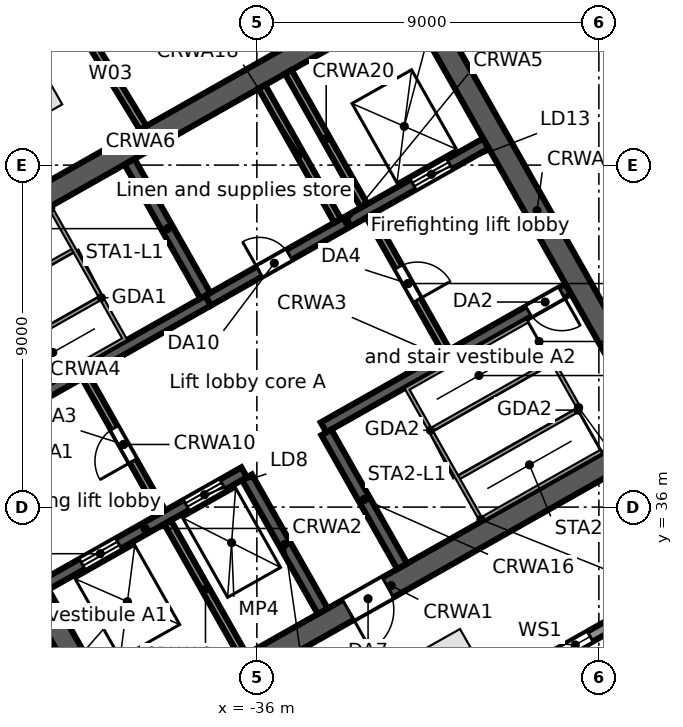
"""IFC4 building model, lengths in metres.
Left out: names, types, materials, properties, quantities, classifications, styles, units other than length and angle.
Written with IfcOpenShell. Run it as: python <this file> out.ifc"""

import sys

from ifc_helpers import new_model, si_unit, direction, frame, frame_2d, origin, origin_2d, place, context, subcontext, project, spatial, rectangle, extrude, element, fill, save


model = new_model("IFC4")
c1 = context("Model", 3, precision=1e-05, world=origin(), true_north=direction((0.0, 1.0)))
c2 = subcontext(c1, "Body", "Model", "MODEL_VIEW")
j1 = project(units=[si_unit("LENGTHUNIT", "METRE"), si_unit("PLANEANGLEUNIT", "RADIAN")], contexts=[c1])
p1 = place(None, origin())
s1 = spatial("IfcSite", under=j1, at=p1, CompositionType="ELEMENT")
p2 = place(p1, origin())
s2 = spatial("IfcBuilding", under=s1, at=p2, CompositionType="ELEMENT")
p3 = place(p2, frame((0.0, 0.0, 86.5)))
s3 = spatial("IfcBuildingStorey", under=s2, at=p3, CompositionType="ELEMENT", Elevation=86.5)
for number, where, z_axis, x_axis in (
    (1, (-42.28, 46.919, 0.0), (0.0, 0.0, 1.0), (-0.87, -0.492, 0.0)),
    (2, (-30.976, 31.635, 0.0), (0.0, 0.0, 1.0), (0.87, 0.492, 0.0)),
):
    element("IfcColumn", number, at=place(p3, frame(where, z_axis=z_axis, x_axis=x_axis)), inside=s3, PredefinedType="COLUMN", context=c2, shape_type="SweptSolid", body=[
        extrude(rectangle(XDim=1.7, YDim=1.7, at=origin_2d()), origin(), (0.0, 0.0, 1.0), 5.0),
    ])
p4 = place(p3, frame((-58.745, 38.764, 0.0), z_axis=(0.0, 0.0, 1.0), x_axis=(0.870355811726, 0.492423355453, 0.0)))
e3 = element("IfcWall", 3, at=p4, inside=s3, PredefinedType="STANDARD", context=c2, shape_type="SweptSolid", body=[
    extrude(rectangle(XDim=64.025, YDim=0.3, at=frame_2d((32.013, 0.0))), origin(), (0.0, 0.0, 1.0), 4.65),
])
p5 = place(p4, frame((60.122, 0.0, 0.6)))
e4 = element("IfcOpeningElement", 4, at=p5, cuts=e3, PredefinedType="OPENING", context=c2, shape_type="SweptSolid", body=[
    extrude(rectangle(XDim=0.9, YDim=3.2, at=frame_2d((0.45, 1.6))), frame((0.0, 0.16, 0.0), z_axis=(0.0, -1.0, 0.0), x_axis=(1.0, 0.0, 0.0)), (0.0, 0.0, 1.0), 0.32),
])
p6 = place(p4, frame((50.992, 0.0, 0.6)))
e5 = element("IfcOpeningElement", 5, at=p6, cuts=e3, PredefinedType="OPENING", context=c2, shape_type="SweptSolid", body=[
    extrude(rectangle(XDim=0.9, YDim=3.2, at=frame_2d((0.45, 1.6))), frame((0.0, 0.16, 0.0), z_axis=(0.0, -1.0, 0.0), x_axis=(1.0, 0.0, 0.0)), (0.0, 0.0, 1.0), 0.32),
])
p7 = place(p4, frame((41.862, 0.0, 0.6)))
e6 = element("IfcOpeningElement", 6, at=p7, cuts=e3, PredefinedType="OPENING", context=c2, shape_type="SweptSolid", body=[
    extrude(rectangle(XDim=0.9, YDim=3.2, at=frame_2d((0.45, 1.6))), frame((0.0, 0.16, 0.0), z_axis=(0.0, -1.0, 0.0), x_axis=(1.0, 0.0, 0.0)), (0.0, 0.0, 1.0), 0.32),
])
p8 = place(p4, frame((32.732, 0.0, 0.6)))
e7 = element("IfcOpeningElement", 7, at=p8, cuts=e3, PredefinedType="OPENING", context=c2, shape_type="SweptSolid", body=[
    extrude(rectangle(XDim=0.9, YDim=3.2, at=frame_2d((0.45, 1.6))), frame((0.0, 0.16, 0.0), z_axis=(0.0, -1.0, 0.0), x_axis=(1.0, 0.0, 0.0)), (0.0, 0.0, 1.0), 0.32),
])
p9 = place(p4, frame((23.602, 0.0, 0.6)))
e8 = element("IfcOpeningElement", 8, at=p9, cuts=e3, PredefinedType="OPENING", context=c2, shape_type="SweptSolid", body=[
    extrude(rectangle(XDim=0.9, YDim=3.2, at=frame_2d((0.45, 1.6))), frame((0.0, 0.16, 0.0), z_axis=(0.0, -1.0, 0.0), x_axis=(1.0, 0.0, 0.0)), (0.0, 0.0, 1.0), 0.32),
])
p10 = place(p4, frame((14.472, 0.0, 0.6)))
e9 = element("IfcOpeningElement", 9, at=p10, cuts=e3, PredefinedType="OPENING", context=c2, shape_type="SweptSolid", body=[
    extrude(rectangle(XDim=0.9, YDim=3.2, at=frame_2d((0.45, 1.6))), frame((0.0, 0.16, 0.0), z_axis=(0.0, -1.0, 0.0), x_axis=(1.0, 0.0, 0.0)), (0.0, 0.0, 1.0), 0.32),
])
p11 = place(p4, frame((5.342, 0.0, 0.6)))
e10 = element("IfcOpeningElement", 10, at=p11, cuts=e3, PredefinedType="OPENING", context=c2, shape_type="SweptSolid", body=[
    extrude(rectangle(XDim=0.9, YDim=3.2, at=frame_2d((0.45, 1.6))), frame((0.0, 0.16, 0.0), z_axis=(0.0, -1.0, 0.0), x_axis=(1.0, 0.0, 0.0)), (0.0, 0.0, 1.0), 0.32),
])
p12 = place(p3, frame((-0.055, 47.969, 0.0), z_axis=(0.0, 0.0, 1.0), x_axis=(-0.870355730478, -0.492423499058, 0.0)))
e11 = element("IfcWall", 11, at=p12, inside=s3, PredefinedType="STANDARD", context=c2, shape_type="SweptSolid", body=[
    extrude(rectangle(XDim=43.75, YDim=0.3, at=frame_2d((21.875, 0.0))), origin(), (0.0, 0.0, 1.0), 4.65),
])
p13 = place(p12, frame((39.977, 0.0, 0.6)))
e12 = element("IfcOpeningElement", 12, at=p13, cuts=e11, PredefinedType="OPENING", context=c2, shape_type="SweptSolid", body=[
    extrude(rectangle(XDim=0.9, YDim=3.2, at=frame_2d((0.45, 1.6))), frame((0.0, 0.16, 0.0), z_axis=(0.0, -1.0, 0.0), x_axis=(1.0, 0.0, 0.0)), (0.0, 0.0, 1.0), 0.32),
])
p14 = place(p12, frame((31.222, 0.0, 0.6)))
e13 = element("IfcOpeningElement", 13, at=p14, cuts=e11, PredefinedType="OPENING", context=c2, shape_type="SweptSolid", body=[
    extrude(rectangle(XDim=0.9, YDim=3.2, at=frame_2d((0.45, 1.6))), frame((0.0, 0.16, 0.0), z_axis=(0.0, -1.0, 0.0), x_axis=(1.0, 0.0, 0.0)), (0.0, 0.0, 1.0), 0.32),
])
p15 = place(p12, frame((22.468, 0.0, 0.6)))
e14 = element("IfcOpeningElement", 14, at=p15, cuts=e11, PredefinedType="OPENING", context=c2, shape_type="SweptSolid", body=[
    extrude(rectangle(XDim=0.9, YDim=3.2, at=frame_2d((0.45, 1.6))), frame((0.0, 0.16, 0.0), z_axis=(0.0, -1.0, 0.0), x_axis=(1.0, 0.0, 0.0)), (0.0, 0.0, 1.0), 0.32),
])
p16 = place(p12, frame((13.713, 0.0, 0.6)))
e15 = element("IfcOpeningElement", 15, at=p16, cuts=e11, PredefinedType="OPENING", context=c2, shape_type="SweptSolid", body=[
    extrude(rectangle(XDim=0.9, YDim=3.2, at=frame_2d((0.45, 1.6))), frame((0.0, 0.16, 0.0), z_axis=(0.0, -1.0, 0.0), x_axis=(1.0, 0.0, 0.0)), (0.0, 0.0, 1.0), 0.32),
])
p17 = place(p12, frame((4.959, 0.0, 0.6)))
e16 = element("IfcOpeningElement", 16, at=p17, cuts=e11, PredefinedType="OPENING", context=c2, shape_type="SweptSolid", body=[
    extrude(rectangle(XDim=0.9, YDim=3.2, at=frame_2d((0.45, 1.6))), frame((0.0, 0.16, 0.0), z_axis=(0.0, -1.0, 0.0), x_axis=(1.0, 0.0, 0.0)), (0.0, 0.0, 1.0), 0.32),
])
p18 = place(p3, frame((-39.862, 29.749, 0.0), z_axis=(0.0, 0.0, 1.0), x_axis=(0.870350116061, 0.492433422375, 0.0)))
e17 = element("IfcWall", 17, at=p18, inside=s3, PredefinedType="SOLIDWALL", context=c2, shape_type="SweptSolid", body=[
    extrude(rectangle(XDim=17.0, YDim=0.6, at=frame_2d((8.5, 0.0))), origin(), (0.0, 0.0, 1.0), 4.65),
])
p19 = place(p18, frame((7.2, 0.0, 0.0)))
e18 = element("IfcOpeningElement", 18, at=p19, cuts=e17, PredefinedType="OPENING", context=c2, shape_type="SweptSolid", body=[
    extrude(rectangle(XDim=1.2, YDim=2.1, at=frame_2d((0.6, 1.05))), frame((0.0, 0.31, 0.0), z_axis=(0.0, -1.0, 0.0), x_axis=(1.0, 0.0, 0.0)), (0.0, 0.0, 1.0), 0.62),
])
p20 = place(p3, frame((-41.556, 33.961, 0.0), z_axis=(0.0, 0.0, 1.0), x_axis=(0.870343731308, 0.492444706919, 0.0)))
e19 = element("IfcWall", 19, at=p20, inside=s3, PredefinedType="SOLIDWALL", context=c2, shape_type="SweptSolid", body=[
    extrude(rectangle(XDim=6.0, YDim=0.3, at=frame_2d((3.0, 0.0))), origin(), (0.0, 0.0, 1.0), 4.65),
])
p21 = place(p20, frame((1.1, 0.0, 0.0)))
e20 = element("IfcOpeningElement", 20, at=p21, cuts=e19, PredefinedType="OPENING", context=c2, shape_type="SweptSolid", body=[
    extrude(rectangle(XDim=1.1, YDim=2.1, at=frame_2d((0.55, 1.05))), frame((0.0, 0.16, 0.0), z_axis=(0.0, -1.0, 0.0), x_axis=(1.0, 0.0, 0.0)), (0.0, 0.0, 1.0), 0.32),
])
p22 = place(p20, frame((4.25, 0.0, 0.0)))
e21 = element("IfcOpeningElement", 21, at=p22, cuts=e19, PredefinedType="OPENING", context=c2, shape_type="SweptSolid", body=[
    extrude(rectangle(XDim=1.1, YDim=2.1, at=frame_2d((0.55, 1.05))), frame((0.0, 0.16, 0.0), z_axis=(0.0, -1.0, 0.0), x_axis=(1.0, 0.0, 0.0)), (0.0, 0.0, 1.0), 0.32),
])
p23 = place(p3, frame((-34.245, 38.097, 0.0), z_axis=(0.0, 0.0, 1.0), x_axis=(0.870364910201, 0.492407273597, 0.0)))
e22 = element("IfcWall", 22, at=p23, inside=s3, PredefinedType="SOLIDWALL", context=c2, shape_type="SweptSolid", body=[
    extrude(rectangle(XDim=7.4, YDim=0.3, at=frame_2d((3.7, 0.0))), origin(), (0.0, 0.0, 1.0), 4.65),
])
p24 = place(p23, frame((6.2, 0.0, 0.0)))
e23 = element("IfcOpeningElement", 23, at=p24, cuts=e22, PredefinedType="OPENING", context=c2, shape_type="SweptSolid", body=[
    extrude(rectangle(XDim=1.0, YDim=2.1, at=frame_2d((0.5, 1.05))), frame((0.0, 0.16, 0.0), z_axis=(0.0, -1.0, 0.0), x_axis=(1.0, 0.0, 0.0)), (0.0, 0.0, 1.0), 0.32),
])
p25 = place(p3, frame((-43.723, 37.791, 0.0), z_axis=(0.0, 0.0, 1.0), x_axis=(0.87035077051, 0.49243226567, 0.0)))
e24 = element("IfcWall", 24, at=p25, inside=s3, PredefinedType="SOLIDWALL", context=c2, shape_type="SweptSolid", body=[
    extrude(rectangle(XDim=7.4, YDim=0.3, at=frame_2d((3.7, 0.0))), origin(), (0.0, 0.0, 1.0), 4.65),
])
p26 = place(p25, frame((0.2, 0.0, 0.0)))
e25 = element("IfcOpeningElement", 25, at=p26, cuts=e24, PredefinedType="OPENING", context=c2, shape_type="SweptSolid", body=[
    extrude(rectangle(XDim=1.0, YDim=2.1, at=frame_2d((0.5, 1.05))), frame((0.0, 0.16, 0.0), z_axis=(0.0, -1.0, 0.0), x_axis=(1.0, 0.0, 0.0)), (0.0, 0.0, 1.0), 0.32),
])
p27 = place(p3, frame((-37.282, 41.435, 0.0), z_axis=(0.0, 0.0, 1.0), x_axis=(0.870356516133, 0.492422110414, 0.0)))
e26 = element("IfcWall", 26, at=p27, inside=s3, PredefinedType="SOLIDWALL", context=c2, shape_type="SweptSolid", body=[
    extrude(rectangle(XDim=8.4, YDim=0.3, at=frame_2d((4.2, 0.0))), origin(), (0.0, 0.0, 1.0), 4.65),
])
p28 = place(p27, frame((6.2, 0.0, 0.0)))
e27 = element("IfcOpeningElement", 27, at=p28, cuts=e26, PredefinedType="OPENING", context=c2, shape_type="SweptSolid", body=[
    extrude(rectangle(XDim=1.1, YDim=2.1, at=frame_2d((0.55, 1.05))), frame((0.0, 0.16, 0.0), z_axis=(0.0, -1.0, 0.0), x_axis=(1.0, 0.0, 0.0)), (0.0, 0.0, 1.0), 0.32),
])
p29 = place(p27, frame((1.55, 0.0, 0.0)))
e28 = element("IfcOpeningElement", 28, at=p29, cuts=e26, PredefinedType="OPENING", context=c2, shape_type="SweptSolid", body=[
    extrude(rectangle(XDim=0.9, YDim=2.1, at=frame_2d((0.45, 1.05))), frame((0.0, 0.16, 0.0), z_axis=(0.0, -1.0, 0.0), x_axis=(1.0, 0.0, 0.0)), (0.0, 0.0, 1.0), 0.32),
])
p30 = place(p3, frame((-46.461, 41.412, 0.0), z_axis=(0.0, 0.0, 1.0), x_axis=(0.870350116061, 0.492433422375, 0.0)))
e29 = element("IfcWall", 29, at=p30, inside=s3, PredefinedType="SOLIDWALL", context=c2, shape_type="SweptSolid", body=[
    extrude(rectangle(XDim=17.0, YDim=0.6, at=frame_2d((8.5, 0.0))), origin(), (0.0, 0.0, 1.0), 4.65),
])
p31 = place(p3, frame((-46.052, 41.298, 0.0), z_axis=(0.0, 0.0, 1.0), x_axis=(0.492418598281, -0.870358503186, 0.0)))
e30 = element("IfcWall", 30, at=p31, inside=s3, PredefinedType="SOLIDWALL", context=c2, shape_type="SweptSolid", body=[
    extrude(rectangle(XDim=12.8, YDim=0.6, at=frame_2d((6.4, 0.0))), origin(), (0.0, 0.0, 1.0), 4.65),
])
p32 = place(p3, frame((-38.349, 35.603, 0.0), z_axis=(0.0, 0.0, 1.0), x_axis=(0.49241474071, -0.870360685654, 0.0)))
e31 = element("IfcWall", 31, at=p32, inside=s3, PredefinedType="SOLIDWALL", context=c2, shape_type="SweptSolid", body=[
    extrude(rectangle(XDim=4.05, YDim=0.2, at=frame_2d((2.025, 0.0))), origin(), (0.0, 0.0, 1.0), 4.65),
])
p33 = place(p3, frame((-40.516, 39.433, 0.0), z_axis=(0.0, 0.0, 1.0), x_axis=(0.492453559952, -0.87033872216, 0.0)))
e32 = element("IfcWall", 32, at=p33, inside=s3, PredefinedType="PARTITIONING", context=c2, shape_type="SweptSolid", body=[
    extrude(rectangle(XDim=4.1, YDim=0.2, at=frame_2d((2.05, 0.0))), origin(), (0.0, 0.0, 1.0), 4.65),
])
p34 = place(p33, frame((1.55, 0.0, 0.0)))
e33 = element("IfcOpeningElement", 33, at=p34, cuts=e32, PredefinedType="OPENING", context=c2, shape_type="SweptSolid", body=[
    extrude(rectangle(XDim=1.0, YDim=2.1, at=frame_2d((0.5, 1.05))), frame((0.0, 0.11, 0.0), z_axis=(0.0, -1.0, 0.0), x_axis=(1.0, 0.0, 0.0)), (0.0, 0.0, 1.0), 0.22),
])
p35 = place(p3, frame((-36.26, 36.785, 0.0), z_axis=(0.0, 0.0, 1.0), x_axis=(0.492440575896, -0.870346068648, 0.0)))
e34 = element("IfcWall", 34, at=p35, inside=s3, PredefinedType="SOLIDWALL", context=c2, shape_type="SweptSolid", body=[
    extrude(rectangle(XDim=4.05, YDim=0.3, at=frame_2d((2.025, 0.0))), origin(), (0.0, 0.0, 1.0), 4.65),
])
p36 = place(p3, frame((-39.35, 45.09, 0.0), z_axis=(0.0, 0.0, 1.0), x_axis=(0.49241474071, -0.870360685654, 0.0)))
e35 = element("IfcWall", 35, at=p36, inside=s3, PredefinedType="SOLIDWALL", context=c2, shape_type="SweptSolid", body=[
    extrude(rectangle(XDim=4.05, YDim=0.3, at=frame_2d((2.025, 0.0))), origin(), (0.0, 0.0, 1.0), 4.65),
])
p37 = place(p3, frame((-34.171, 37.967, 0.0), z_axis=(0.0, 0.0, 1.0), x_axis=(0.492394910396, -0.870371904542, 0.0)))
e36 = element("IfcWall", 36, at=p37, inside=s3, PredefinedType="SOLIDWALL", context=c2, shape_type="SweptSolid", body=[
    extrude(rectangle(XDim=4.05, YDim=0.3, at=frame_2d((2.025, 0.0))), origin(), (0.0, 0.0, 1.0), 4.65),
])
p38 = place(p3, frame((-35.869, 47.06, 0.0), z_axis=(0.0, 0.0, 1.0), x_axis=(0.49241474071, -0.870360685654, 0.0)))
e37 = element("IfcWall", 37, at=p38, inside=s3, PredefinedType="SOLIDWALL", context=c2, shape_type="SweptSolid", body=[
    extrude(rectangle(XDim=4.05, YDim=0.2, at=frame_2d((2.025, 0.0))), origin(), (0.0, 0.0, 1.0), 4.65),
])
p39 = place(p3, frame((-33.031, 43.667, 0.0), z_axis=(0.0, 0.0, 1.0), x_axis=(0.492408451753, -0.87036424366, 0.0)))
e38 = element("IfcWall", 38, at=p39, inside=s3, PredefinedType="PARTITIONING", context=c2, shape_type="SweptSolid", body=[
    extrude(rectangle(XDim=4.1, YDim=0.2, at=frame_2d((2.05, 0.0))), origin(), (0.0, 0.0, 1.0), 4.65),
])
p40 = place(p39, frame((1.55, 0.0, 0.0)))
e39 = element("IfcOpeningElement", 39, at=p40, cuts=e38, PredefinedType="OPENING", context=c2, shape_type="SweptSolid", body=[
    extrude(rectangle(XDim=1.0, YDim=2.1, at=frame_2d((0.5, 1.05))), frame((0.0, 0.11, 0.0), z_axis=(0.0, -1.0, 0.0), x_axis=(1.0, 0.0, 0.0)), (0.0, 0.0, 1.0), 0.22),
])
p41 = place(p3, frame((-35.173, 47.454, 0.0), z_axis=(0.0, 0.0, 1.0), x_axis=(0.492440575896, -0.870346068648, 0.0)))
e40 = element("IfcWall", 40, at=p41, inside=s3, PredefinedType="SOLIDWALL", context=c2, shape_type="SweptSolid", body=[
    extrude(rectangle(XDim=4.05, YDim=0.2, at=frame_2d((2.025, 0.0))), origin(), (0.0, 0.0, 1.0), 4.65),
])
p42 = place(p3, frame((-31.778, 49.374, 0.0), z_axis=(0.0, 0.0, 1.0), x_axis=(0.492433046652, -0.870350328641, 0.0)))
e41 = element("IfcWall", 41, at=p42, inside=s3, PredefinedType="SOLIDWALL", context=c2, shape_type="SweptSolid", body=[
    extrude(rectangle(XDim=12.8, YDim=0.6, at=frame_2d((6.4, 0.0))), origin(), (0.0, 0.0, 1.0), 4.65),
])
p43 = place(p3, frame((-40.713, 48.794, 0.0), z_axis=(0.0, 0.0, 1.0), x_axis=(0.52165366254, -0.853157345604, 0.0)))
e42 = element("IfcWall", 42, at=p43, inside=s3, PredefinedType="PARTITIONING", context=c2, shape_type="SweptSolid", body=[
    extrude(rectangle(XDim=3.297, YDim=0.2, at=frame_2d((1.648, 0.0))), origin(), (0.0, 0.0, 1.0), 3.83),
])
p44 = place(p14, origin())
e43 = element("IfcWindow", 43, at=p44, inside=s3, PartitioningType="SINGLE_PANEL", PredefinedType="WINDOW", context=c2, shape_type="SweptSolid", body=[
    extrude(rectangle(XDim=0.9, YDim=3.2, at=frame_2d((0.45, 1.6))), frame((0.0, 0.03, 0.0), z_axis=(0.0, -1.0, 0.0), x_axis=(1.0, 0.0, 0.0)), (0.0, 0.0, 1.0), 0.06),
])
fill(e13, e43)
p45 = place(p28, origin())
e44 = element("IfcDoor", 44, at=p45, inside=s3, OperationType="DOUBLE_DOOR_SLIDING", PredefinedType="DOOR", context=c2, shape_type="SweptSolid", body=[
    extrude(rectangle(XDim=1.1, YDim=2.1, at=frame_2d((0.55, 1.05))), frame((0.0, 0.025, 0.0), z_axis=(0.0, -1.0, 0.0), x_axis=(1.0, 0.0, 0.0)), (0.0, 0.0, 1.0), 0.05),
])
fill(e27, e44)
p46 = place(p21, origin())
e45 = element("IfcDoor", 45, at=p46, inside=s3, OperationType="DOUBLE_DOOR_SLIDING", PredefinedType="DOOR", context=c2, shape_type="SweptSolid", body=[
    extrude(rectangle(XDim=1.1, YDim=2.1, at=frame_2d((0.55, 1.05))), frame((0.0, 0.025, 0.0), z_axis=(0.0, -1.0, 0.0), x_axis=(1.0, 0.0, 0.0)), (0.0, 0.0, 1.0), 0.05),
])
fill(e20, e45)
p47 = place(p22, origin())
e46 = element("IfcDoor", 46, at=p47, inside=s3, OperationType="DOUBLE_DOOR_SLIDING", PredefinedType="DOOR", context=c2, shape_type="SweptSolid", body=[
    extrude(rectangle(XDim=1.1, YDim=2.1, at=frame_2d((0.55, 1.05))), frame((0.0, 0.025, 0.0), z_axis=(0.0, -1.0, 0.0), x_axis=(1.0, 0.0, 0.0)), (0.0, 0.0, 1.0), 0.05),
])
fill(e21, e46)
p48 = place(p24, frame((1.0, 0.0, 0.0), z_axis=(0.0, 0.0, 1.0), x_axis=(-1.0, 0.0, 0.0)))
e47 = element("IfcDoor", 47, at=p48, inside=s3, OperationType="SINGLE_SWING_LEFT", PredefinedType="DOOR", context=c2, shape_type="SweptSolid", body=[
    extrude(rectangle(XDim=1.0, YDim=2.1, at=frame_2d((0.5, 1.05))), frame((0.0, 0.025, 0.0), z_axis=(0.0, -1.0, 0.0), x_axis=(1.0, 0.0, 0.0)), (0.0, 0.0, 1.0), 0.05),
])
fill(e23, e47)
p49 = place(p34, frame((1.0, 0.0, 0.0), z_axis=(0.0, 0.0, 1.0), x_axis=(-1.0, 0.0, 0.0)))
e48 = element("IfcDoor", 48, at=p49, inside=s3, OperationType="SINGLE_SWING_LEFT", PredefinedType="DOOR", context=c2, shape_type="SweptSolid", body=[
    extrude(rectangle(XDim=1.0, YDim=2.1, at=frame_2d((0.5, 1.05))), frame((0.0, 0.025, 0.0), z_axis=(0.0, -1.0, 0.0), x_axis=(1.0, 0.0, 0.0)), (0.0, 0.0, 1.0), 0.05),
])
fill(e33, e48)
p50 = place(p40, origin())
e49 = element("IfcDoor", 49, at=p50, inside=s3, OperationType="SINGLE_SWING_RIGHT", PredefinedType="DOOR", context=c2, shape_type="SweptSolid", body=[
    extrude(rectangle(XDim=1.0, YDim=2.1, at=frame_2d((0.5, 1.05))), frame((0.0, 0.025, 0.0), z_axis=(0.0, -1.0, 0.0), x_axis=(1.0, 0.0, 0.0)), (0.0, 0.0, 1.0), 0.05),
])
fill(e39, e49)
p51 = place(p19, frame((1.2, 0.0, 0.0), z_axis=(0.0, 0.0, 1.0), x_axis=(-1.0, 0.0, 0.0)))
e50 = element("IfcDoor", 50, at=p51, inside=s3, OperationType="SINGLE_SWING_RIGHT", PredefinedType="DOOR", context=c2, shape_type="SweptSolid", body=[
    extrude(rectangle(XDim=1.2, YDim=2.1, at=frame_2d((0.6, 1.05))), frame((0.0, 0.025, 0.0), z_axis=(0.0, -1.0, 0.0), x_axis=(1.0, 0.0, 0.0)), (0.0, 0.0, 1.0), 0.05),
])
fill(e18, e50)
p52 = place(p29, origin())
e51 = element("IfcDoor", 51, at=p52, inside=s3, OperationType="SINGLE_SWING_LEFT", PredefinedType="DOOR", context=c2, shape_type="SweptSolid", body=[
    extrude(rectangle(XDim=0.9, YDim=2.1, at=frame_2d((0.45, 1.05))), frame((0.0, 0.025, 0.0), z_axis=(0.0, -1.0, 0.0), x_axis=(1.0, 0.0, 0.0)), (0.0, 0.0, 1.0), 0.05),
])
fill(e28, e51)
save(model, sys.argv[1])
